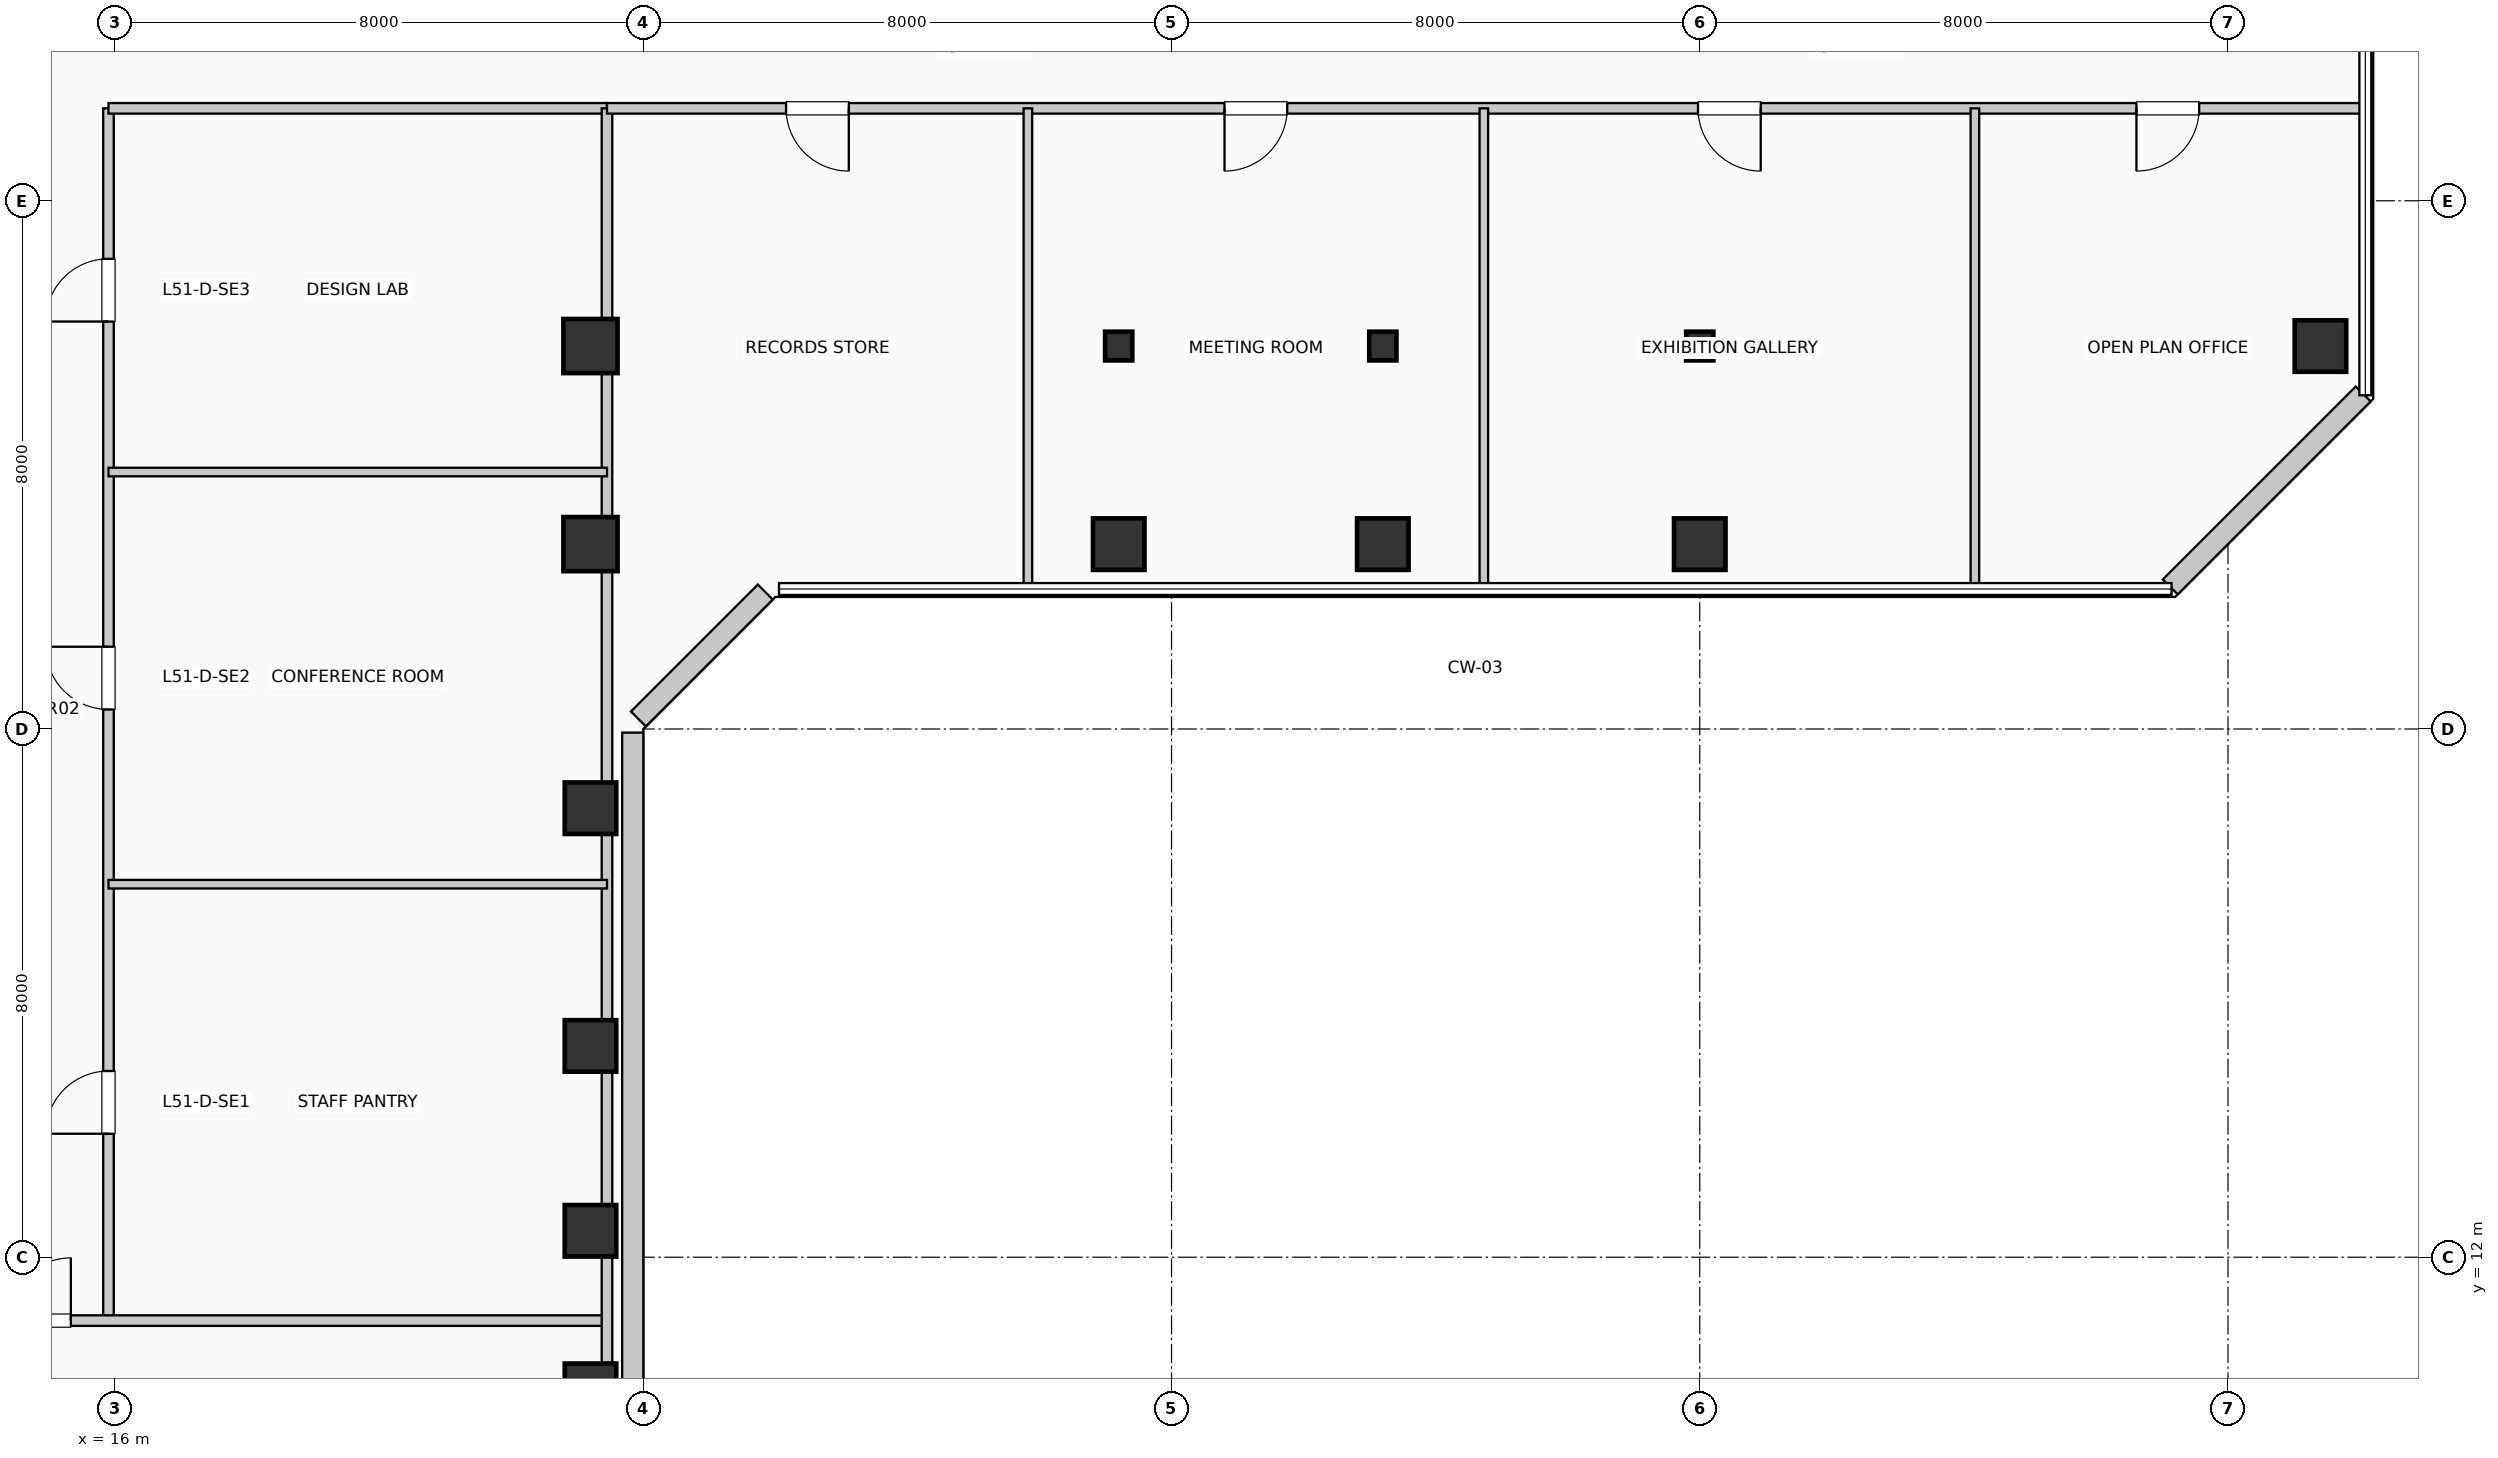
"""IFC4 building model, lengths in metres.
Left out: names, types, materials, properties, quantities, classifications, styles, units other than length and angle.
Written with IfcOpenShell. Run it as: python <this file> out.ifc"""

import sys

from ifc_helpers import new_model, si_unit, direction, frame, frame_2d, origin, origin_2d, place, context, subcontext, project, spatial, rectangle, i_section, extrude, element, fill, save


model = new_model("IFC4")
c1 = context("Model", 3, precision=1e-05, world=origin(), true_north=direction((0.0, 1.0)))
c2 = subcontext(c1, "Body", "Model", "MODEL_VIEW")
j1 = project(units=[si_unit("LENGTHUNIT", "METRE"), si_unit("PLANEANGLEUNIT", "RADIAN")], contexts=[c1])
p1 = place(None, origin())
s1 = spatial("IfcSite", under=j1, at=p1, CompositionType="ELEMENT")
p2 = place(p1, origin())
s2 = spatial("IfcBuilding", under=s1, at=p2, CompositionType="ELEMENT")
p3 = place(p2, frame((0.0, 0.0, 211.2)))
s3 = spatial("IfcBuildingStorey", under=s2, at=p3, CompositionType="ELEMENT", Elevation=211.2)
for number, where, z_axis, x_axis in (
    (1, (23.2, 10.0, 0.0), (0.0, 0.0, 1.0), (1.0, 0.0, 0.0)),
    (2, (23.2, 12.4, 0.0), (0.0, 0.0, 1.0), (1.0, 0.0, 0.0)),
    (3, (23.2, 15.2, 0.0), (0.0, 0.0, 1.0), (1.0, 0.0, 0.0)),
    (4, (23.2, 18.8, 0.0), (0.0, 0.0, 1.0), (1.0, 0.0, 0.0)),
):
    element("IfcColumn", number, at=place(p3, frame(where, z_axis=z_axis, x_axis=x_axis)), inside=s3, PredefinedType="COLUMN", context=c2, shape_type="SweptSolid", body=[
        extrude(rectangle(XDim=0.78, YDim=0.78, at=origin_2d()), origin(), (0.0, 0.0, 1.0), 3.96),
    ])
for number, where, z_axis, x_axis in (
    (5, (23.2, 22.8, 0.0), (0.0, 0.0, 1.0), (1.0, 0.0, 0.0)),
    (6, (23.2, 25.8, 0.0), (0.0, 0.0, 1.0), (1.0, 0.0, 0.0)),
):
    element("IfcColumn", number, at=place(p3, frame(where, z_axis=z_axis, x_axis=x_axis)), inside=s3, PredefinedType="COLUMN", context=c2, shape_type="SweptSolid", body=[
        extrude(rectangle(XDim=0.82, YDim=0.82, at=origin_2d()), origin(), (0.0, 0.0, 1.0), 3.96),
    ])
p4 = place(p3, frame((31.2, 22.8, 0.0), z_axis=(0.0, 0.0, 1.0), x_axis=(1.0, 0.0, 0.0)))
e7 = element("IfcColumn", 7, at=p4, inside=s3, PredefinedType="COLUMN", context=c2, shape_type="SweptSolid", body=[
    extrude(rectangle(XDim=0.78, YDim=0.78, at=origin_2d()), origin(), (0.0, 0.0, 1.0), 3.96),
])
p5 = place(p3, frame((31.2, 25.8, 0.0), z_axis=(0.0, 0.0, 1.0), x_axis=(1.0, 0.0, 0.0)))
e8 = element("IfcColumn", 8, at=p5, inside=s3, PredefinedType="COLUMN", context=c2, shape_type="SweptSolid", body=[
    extrude(i_section(OverallWidth=0.412, OverallDepth=0.435, WebThickness=0.027, FlangeThickness=0.043, at=origin_2d()), origin(), (0.0, 0.0, 1.0), 3.96),
])
p6 = place(p3, frame((35.2, 22.8, 0.0), z_axis=(0.0, 0.0, 1.0), x_axis=(1.0, 0.0, 0.0)))
e9 = element("IfcColumn", 9, at=p6, inside=s3, PredefinedType="COLUMN", context=c2, shape_type="SweptSolid", body=[
    extrude(rectangle(XDim=0.78, YDim=0.78, at=origin_2d()), origin(), (0.0, 0.0, 1.0), 3.96),
])
p7 = place(p3, frame((35.2, 25.8, 0.0), z_axis=(0.0, 0.0, 1.0), x_axis=(1.0, 0.0, 0.0)))
e10 = element("IfcColumn", 10, at=p7, inside=s3, PredefinedType="COLUMN", context=c2, shape_type="SweptSolid", body=[
    extrude(i_section(OverallWidth=0.412, OverallDepth=0.435, WebThickness=0.027, FlangeThickness=0.043, at=origin_2d()), origin(), (0.0, 0.0, 1.0), 3.96),
])
p8 = place(p3, frame((40.0, 22.8, 0.0), z_axis=(0.0, 0.0, 1.0), x_axis=(1.0, 0.0, 0.0)))
e11 = element("IfcColumn", 11, at=p8, inside=s3, PredefinedType="COLUMN", context=c2, shape_type="SweptSolid", body=[
    extrude(rectangle(XDim=0.78, YDim=0.78, at=origin_2d()), origin(), (0.0, 0.0, 1.0), 3.96),
])
p9 = place(p3, frame((40.0, 25.8, 0.0), z_axis=(0.0, 0.0, 1.0), x_axis=(1.0, 0.0, 0.0)))
e12 = element("IfcColumn", 12, at=p9, inside=s3, PredefinedType="COLUMN", context=c2, shape_type="SweptSolid", body=[
    extrude(i_section(OverallWidth=0.412, OverallDepth=0.435, WebThickness=0.027, FlangeThickness=0.043, at=origin_2d()), origin(), (0.0, 0.0, 1.0), 3.96),
])
p10 = place(p3, frame((49.4, 25.8, 0.0), z_axis=(0.0, 0.0, 1.0), x_axis=(1.0, 0.0, 0.0)))
e13 = element("IfcColumn", 13, at=p10, inside=s3, PredefinedType="COLUMN", context=c2, shape_type="SweptSolid", body=[
    extrude(rectangle(XDim=0.78, YDim=0.78, at=origin_2d()), origin(), (0.0, 0.0, 1.0), 3.96),
])
p11 = place(p3, frame((23.84, 8.855, 0.0), z_axis=(0.0, 0.0, 1.0), x_axis=(0.0, 1.0, 0.0)))
e14 = element("IfcWall", 14, at=p11, inside=s3, PredefinedType="SOLIDWALL", context=c2, shape_type="SweptSolid", body=[
    extrude(rectangle(XDim=11.09, YDim=0.32, at=frame_2d((5.545, 0.0))), origin(), (0.0, 0.0, 1.0), 3.71),
])
p12 = place(p3, frame((23.926, 20.152, 0.0), z_axis=(0.0, 0.0, 1.0), x_axis=(0.707106781187, 0.707106781187, 0.0)))
e15 = element("IfcWall", 15, at=p12, inside=s3, PredefinedType="SOLIDWALL", context=c2, shape_type="SweptSolid", body=[
    extrude(rectangle(XDim=2.718, YDim=0.32, at=frame_2d((1.359, 0.0))), origin(), (0.0, 0.0, 1.0), 3.71),
])
p13 = place(p3, frame((47.126, 22.152, 0.0), z_axis=(0.0, 0.0, 1.0), x_axis=(0.707136318428, 0.707077242712, 0.0)))
e16 = element("IfcWall", 16, at=p13, inside=s3, PredefinedType="SOLIDWALL", context=c2, shape_type="SweptSolid", body=[
    extrude(rectangle(XDim=4.133, YDim=0.32, at=frame_2d((2.066, 0.0))), origin(), (0.0, 0.0, 1.0), 3.71),
])
p14 = place(p3, frame((15.9, 11.04, 0.0), z_axis=(0.0, 0.0, 1.0), x_axis=(0.0, 1.0, 0.0)))
e17 = element("IfcWall", 17, at=p14, inside=s3, PredefinedType="PARTITIONING", context=c2, shape_type="SweptSolid", body=[
    extrude(rectangle(XDim=18.36, YDim=0.16, at=frame_2d((9.18, 0.0))), origin(), (0.0, 0.0, 1.0), 3.71),
])
p15 = place(p14, frame((2.83, 0.0, 0.0)))
e18 = element("IfcOpeningElement", 18, at=p15, cuts=e17, PredefinedType="OPENING", context=c2, shape_type="SweptSolid", body=[
    extrude(rectangle(XDim=0.95, YDim=2.15, at=frame_2d((0.475, 1.075))), frame((0.0, 0.09, 0.0), z_axis=(0.0, -1.0, 0.0), x_axis=(1.0, 0.0, 0.0)), (0.0, 0.0, 1.0), 0.18),
])
p16 = place(p14, frame((9.256, 0.0, 0.0)))
e19 = element("IfcOpeningElement", 19, at=p16, cuts=e17, PredefinedType="OPENING", context=c2, shape_type="SweptSolid", body=[
    extrude(rectangle(XDim=0.95, YDim=2.15, at=frame_2d((0.475, 1.075))), frame((0.0, 0.09, 0.0), z_axis=(0.0, -1.0, 0.0), x_axis=(1.0, 0.0, 0.0)), (0.0, 0.0, 1.0), 0.18),
])
p17 = place(p14, frame((15.131, 0.0, 0.0)))
e20 = element("IfcOpeningElement", 20, at=p17, cuts=e17, PredefinedType="OPENING", context=c2, shape_type="SweptSolid", body=[
    extrude(rectangle(XDim=0.95, YDim=2.15, at=frame_2d((0.475, 1.075))), frame((0.0, 0.09, 0.0), z_axis=(0.0, -1.0, 0.0), x_axis=(1.0, 0.0, 0.0)), (0.0, 0.0, 1.0), 0.18),
])
p18 = place(p3, frame((0.19, 11.04, 0.0), z_axis=(0.0, 0.0, 1.0), x_axis=(1.0, 0.0, 0.0)))
e21 = element("IfcWall", 21, at=p18, inside=s3, PredefinedType="PARTITIONING", context=c2, shape_type="SweptSolid", body=[
    extrude(rectangle(XDim=23.26, YDim=0.16, at=frame_2d((11.63, 0.0))), origin(), (0.0, 0.0, 1.0), 3.71),
])
p19 = place(p18, frame((14.19, 0.0, 0.0)))
e22 = element("IfcOpeningElement", 22, at=p19, cuts=e21, PredefinedType="OPENING", context=c2, shape_type="SweptSolid", body=[
    extrude(rectangle(XDim=0.95, YDim=2.15, at=frame_2d((0.475, 1.075))), frame((0.0, 0.09, 0.0), z_axis=(0.0, -1.0, 0.0), x_axis=(1.0, 0.0, 0.0)), (0.0, 0.0, 1.0), 0.18),
])
p20 = place(p3, frame((15.9, 29.4, 0.0), z_axis=(0.0, 0.0, 1.0), x_axis=(1.0, 0.0, 0.0)))
e23 = element("IfcWall", 23, at=p20, inside=s3, PredefinedType="PARTITIONING", context=c2, shape_type="SweptSolid", body=[
    extrude(rectangle(XDim=7.55, YDim=0.16, at=frame_2d((3.775, 0.0))), origin(), (0.0, 0.0, 1.0), 3.365),
])
p21 = place(p3, frame((23.45, 6.84, 0.0), z_axis=(0.0, 0.0, 1.0), x_axis=(0.0, 1.0, 0.0)))
e24 = element("IfcWall", 24, at=p21, inside=s3, PredefinedType="PARTITIONING", context=c2, shape_type="SweptSolid", body=[
    extrude(rectangle(XDim=22.56, YDim=0.16, at=frame_2d((11.28, 0.0))), origin(), (0.0, 0.0, 1.0), 3.095),
])
for number, where, z_axis, x_axis in (
    (25, (15.9, 17.65, 0.0), (0.0, 0.0, 1.0), (1.0, 0.0, 0.0)),
    (26, (15.9, 23.892, 0.0), (0.0, 0.0, 1.0), (1.0, 0.0, 0.0)),
):
    element("IfcWall", number, at=place(p3, frame(where, z_axis=z_axis, x_axis=x_axis)), inside=s3, PredefinedType="PARTITIONING", context=c2, shape_type="SweptSolid", body=[
        extrude(rectangle(XDim=7.55, YDim=0.13, at=frame_2d((3.775, 0.0))), origin(), (0.0, 0.0, 1.0), 3.71),
    ])
p22 = place(p3, frame((23.45, 29.4, 0.0), z_axis=(0.0, 0.0, 1.0), x_axis=(1.0, 0.0, 0.0)))
e27 = element("IfcWall", 27, at=p22, inside=s3, PredefinedType="PARTITIONING", context=c2, shape_type="SweptSolid", body=[
    extrude(rectangle(XDim=26.56, YDim=0.16, at=frame_2d((13.28, 0.0))), origin(), (0.0, 0.0, 1.0), 3.335),
])
p23 = place(p22, frame((3.662, 0.0, 0.0), z_axis=(0.0, 0.0, 1.0), x_axis=(-1.0, 0.0, 0.0)))
e28 = element("IfcOpeningElement", 28, at=p23, cuts=e27, PredefinedType="OPENING", context=c2, shape_type="SweptSolid", body=[
    extrude(rectangle(XDim=0.95, YDim=2.15, at=frame_2d((0.475, 1.075))), frame((0.0, 0.09, 0.0), z_axis=(0.0, -1.0, 0.0), x_axis=(1.0, 0.0, 0.0)), (0.0, 0.0, 1.0), 0.18),
])
p24 = place(p22, frame((10.302, 0.0, 0.0), z_axis=(0.0, 0.0, 1.0), x_axis=(-1.0, 0.0, 0.0)))
e29 = element("IfcOpeningElement", 29, at=p24, cuts=e27, PredefinedType="OPENING", context=c2, shape_type="SweptSolid", body=[
    extrude(rectangle(XDim=0.95, YDim=2.15, at=frame_2d((0.475, 1.075))), frame((0.0, 0.09, 0.0), z_axis=(0.0, -1.0, 0.0), x_axis=(1.0, 0.0, 0.0)), (0.0, 0.0, 1.0), 0.18),
])
p25 = place(p22, frame((17.473, 0.0, 0.0), z_axis=(0.0, 0.0, 1.0), x_axis=(-1.0, 0.0, 0.0)))
e30 = element("IfcOpeningElement", 30, at=p25, cuts=e27, PredefinedType="OPENING", context=c2, shape_type="SweptSolid", body=[
    extrude(rectangle(XDim=0.95, YDim=2.15, at=frame_2d((0.475, 1.075))), frame((0.0, 0.09, 0.0), z_axis=(0.0, -1.0, 0.0), x_axis=(1.0, 0.0, 0.0)), (0.0, 0.0, 1.0), 0.18),
])
p26 = place(p22, frame((24.113, 0.0, 0.0), z_axis=(0.0, 0.0, 1.0), x_axis=(-1.0, 0.0, 0.0)))
e31 = element("IfcOpeningElement", 31, at=p26, cuts=e27, PredefinedType="OPENING", context=c2, shape_type="SweptSolid", body=[
    extrude(rectangle(XDim=0.95, YDim=2.15, at=frame_2d((0.475, 1.075))), frame((0.0, 0.09, 0.0), z_axis=(0.0, -1.0, 0.0), x_axis=(1.0, 0.0, 0.0)), (0.0, 0.0, 1.0), 0.18),
])
for number, where, z_axis, x_axis in (
    (32, (29.824, 22.19, 0.0), (0.0, 0.0, 1.0), (0.0, 1.0, 0.0)),
    (33, (36.73, 22.19, 0.0), (0.0, 0.0, 1.0), (0.0, 1.0, 0.0)),
    (34, (44.167, 22.19, 0.0), (0.0, 0.0, 1.0), (0.0, 1.0, 0.0)),
):
    element("IfcWall", number, at=place(p3, frame(where, z_axis=z_axis, x_axis=x_axis)), inside=s3, PredefinedType="PARTITIONING", context=c2, shape_type="SweptSolid", body=[
        extrude(rectangle(XDim=7.21, YDim=0.13, at=frame_2d((3.605, 0.0))), origin(), (0.0, 0.0, 1.0), 3.71),
    ])
p27 = place(p19, origin())
e35 = element("IfcDoor", 35, at=p27, inside=s3, OperationType="SINGLE_SWING_RIGHT", PredefinedType="DOOR", context=c2, shape_type="SweptSolid", body=[
    extrude(rectangle(XDim=0.95, YDim=2.15, at=frame_2d((0.475, 1.075))), frame((0.0, 0.025, 0.0), z_axis=(0.0, -1.0, 0.0), x_axis=(1.0, 0.0, 0.0)), (0.0, 0.0, 1.0), 0.05),
])
fill(e22, e35)
p28 = place(p15, origin())
e36 = element("IfcDoor", 36, at=p28, inside=s3, OperationType="SINGLE_SWING_LEFT", PredefinedType="DOOR", context=c2, shape_type="SweptSolid", body=[
    extrude(rectangle(XDim=0.95, YDim=2.15, at=frame_2d((0.475, 1.075))), frame((0.0, 0.025, 0.0), z_axis=(0.0, -1.0, 0.0), x_axis=(1.0, 0.0, 0.0)), (0.0, 0.0, 1.0), 0.05),
])
fill(e18, e36)
p29 = place(p16, origin())
e37 = element("IfcDoor", 37, at=p29, inside=s3, OperationType="SINGLE_SWING_RIGHT", PredefinedType="DOOR", context=c2, shape_type="SweptSolid", body=[
    extrude(rectangle(XDim=0.95, YDim=2.15, at=frame_2d((0.475, 1.075))), frame((0.0, 0.025, 0.0), z_axis=(0.0, -1.0, 0.0), x_axis=(1.0, 0.0, 0.0)), (0.0, 0.0, 1.0), 0.05),
])
fill(e19, e37)
p30 = place(p17, origin())
e38 = element("IfcDoor", 38, at=p30, inside=s3, OperationType="SINGLE_SWING_LEFT", PredefinedType="DOOR", context=c2, shape_type="SweptSolid", body=[
    extrude(rectangle(XDim=0.95, YDim=2.15, at=frame_2d((0.475, 1.075))), frame((0.0, 0.025, 0.0), z_axis=(0.0, -1.0, 0.0), x_axis=(1.0, 0.0, 0.0)), (0.0, 0.0, 1.0), 0.05),
])
fill(e20, e38)
p31 = place(p23, origin())
e39 = element("IfcDoor", 39, at=p31, inside=s3, OperationType="SINGLE_SWING_RIGHT", PredefinedType="DOOR", context=c2, shape_type="SweptSolid", body=[
    extrude(rectangle(XDim=0.95, YDim=2.15, at=frame_2d((0.475, 1.075))), frame((0.0, 0.025, 0.0), z_axis=(0.0, -1.0, 0.0), x_axis=(1.0, 0.0, 0.0)), (0.0, 0.0, 1.0), 0.05),
])
fill(e28, e39)
p32 = place(p24, origin())
e40 = element("IfcDoor", 40, at=p32, inside=s3, OperationType="SINGLE_SWING_LEFT", PredefinedType="DOOR", context=c2, shape_type="SweptSolid", body=[
    extrude(rectangle(XDim=0.95, YDim=2.15, at=frame_2d((0.475, 1.075))), frame((0.0, 0.025, 0.0), z_axis=(0.0, -1.0, 0.0), x_axis=(1.0, 0.0, 0.0)), (0.0, 0.0, 1.0), 0.05),
])
fill(e29, e40)
p33 = place(p25, origin())
e41 = element("IfcDoor", 41, at=p33, inside=s3, OperationType="SINGLE_SWING_RIGHT", PredefinedType="DOOR", context=c2, shape_type="SweptSolid", body=[
    extrude(rectangle(XDim=0.95, YDim=2.15, at=frame_2d((0.475, 1.075))), frame((0.0, 0.025, 0.0), z_axis=(0.0, -1.0, 0.0), x_axis=(1.0, 0.0, 0.0)), (0.0, 0.0, 1.0), 0.05),
])
fill(e30, e41)
p34 = place(p26, origin())
e42 = element("IfcDoor", 42, at=p34, inside=s3, OperationType="SINGLE_SWING_LEFT", PredefinedType="DOOR", context=c2, shape_type="SweptSolid", body=[
    extrude(rectangle(XDim=0.95, YDim=2.15, at=frame_2d((0.475, 1.075))), frame((0.0, 0.025, 0.0), z_axis=(0.0, -1.0, 0.0), x_axis=(1.0, 0.0, 0.0)), (0.0, 0.0, 1.0), 0.05),
])
fill(e31, e42)
save(model, sys.argv[1])
